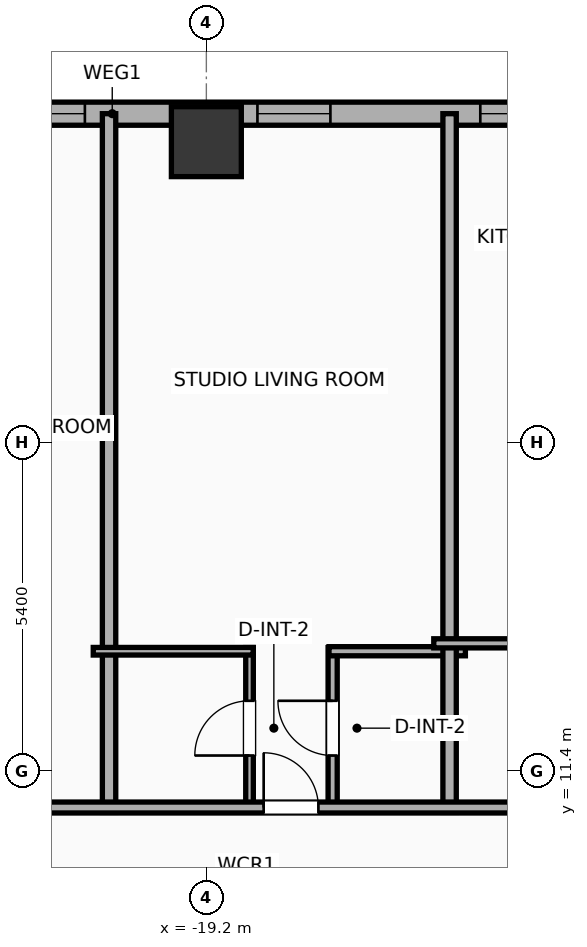
"""IFC4 building model, lengths in metres.
Left out: names, types, materials, properties, quantities, classifications, styles, units other than length and angle.
Written with IfcOpenShell. Run it as: python <this file> out.ifc"""

import sys

from ifc_helpers import new_model, si_unit, direction, frame, frame_2d, origin, origin_2d, place, context, subcontext, project, spatial, rectangle, hollow_rectangle, extrude, element, fill, save


model = new_model("IFC4")
c1 = context("Model", 3, precision=1e-05, world=origin(), true_north=direction((0.0, 1.0)))
c2 = subcontext(c1, "Body", "Model", "MODEL_VIEW")
j1 = project(units=[si_unit("LENGTHUNIT", "METRE"), si_unit("PLANEANGLEUNIT", "RADIAN")], contexts=[c1])
p1 = place(None, origin())
s1 = spatial("IfcSite", under=j1, at=p1, CompositionType="ELEMENT")
p2 = place(p1, origin())
s2 = spatial("IfcBuilding", under=s1, at=p2, CompositionType="ELEMENT")
p3 = place(p2, frame((0.0, 0.0, 61.1)))
s3 = spatial("IfcBuildingStorey", under=s2, at=p3, CompositionType="ELEMENT", Elevation=61.1)
p4 = place(p3, frame((-19.2, 21.75, 0.0), z_axis=(0.0, 0.0, 1.0), x_axis=(1.0, 0.0, 0.0)))
e1 = element("IfcColumn", 1, at=p4, inside=s3, PredefinedType="COLUMN", context=c2, shape_type="SweptSolid", body=[
    extrude(hollow_rectangle(XDim=1.15, YDim=1.15, WallThickness=0.04, at=origin_2d()), origin(), (0.0, 0.0, 1.0), 3.9),
])
p5 = place(p3, frame((-29.581, 22.21, 0.0), z_axis=(0.0, 0.0, 1.0), x_axis=(1.0, 0.0, 0.0)))
e2 = element("IfcWall", 2, at=p5, inside=s3, PredefinedType="ELEMENTEDWALL", context=c2, shape_type="SweptSolid", body=[
    extrude(rectangle(XDim=17.667, YDim=0.38, at=frame_2d((8.833, 0.0))), origin(), (0.0, 0.0, 1.0), 3.65),
])
p6 = place(p5, frame((5.984, 0.0, 0.75)))
e3 = element("IfcOpeningElement", 3, at=p6, cuts=e2, PredefinedType="OPENING", context=c2, shape_type="SweptSolid", body=[
    extrude(rectangle(XDim=2.4, YDim=2.1, at=frame_2d((1.2, 1.05))), frame((0.0, 0.2, 0.0), z_axis=(0.0, -1.0, 0.0), x_axis=(1.0, 0.0, 0.0)), (0.0, 0.0, 1.0), 0.4),
])
p7 = place(p5, frame((1.436, 0.0, 0.75)))
e4 = element("IfcOpeningElement", 4, at=p7, cuts=e2, PredefinedType="OPENING", context=c2, shape_type="SweptSolid", body=[
    extrude(rectangle(XDim=1.2, YDim=2.05, at=frame_2d((0.6, 1.025))), frame((0.0, 0.2, 0.0), z_axis=(0.0, -1.0, 0.0), x_axis=(1.0, 0.0, 0.0)), (0.0, 0.0, 1.0), 0.4),
])
p8 = place(p5, frame((3.686, 0.0, 0.75)))
e5 = element("IfcOpeningElement", 5, at=p8, cuts=e2, PredefinedType="OPENING", context=c2, shape_type="SweptSolid", body=[
    extrude(rectangle(XDim=1.2, YDim=2.05, at=frame_2d((0.6, 1.025))), frame((0.0, 0.2, 0.0), z_axis=(0.0, -1.0, 0.0), x_axis=(1.0, 0.0, 0.0)), (0.0, 0.0, 1.0), 0.4),
])
p9 = place(p5, frame((11.221, 0.0, 0.75)))
e6 = element("IfcOpeningElement", 6, at=p9, cuts=e2, PredefinedType="OPENING", context=c2, shape_type="SweptSolid", body=[
    extrude(rectangle(XDim=1.2, YDim=2.05, at=frame_2d((0.6, 1.025))), frame((0.0, 0.2, 0.0), z_axis=(0.0, -1.0, 0.0), x_axis=(1.0, 0.0, 0.0)), (0.0, 0.0, 1.0), 0.4),
])
p10 = place(p5, frame((14.886, 0.0, 0.75)))
e7 = element("IfcOpeningElement", 7, at=p10, cuts=e2, PredefinedType="OPENING", context=c2, shape_type="SweptSolid", body=[
    extrude(rectangle(XDim=1.2, YDim=2.05, at=frame_2d((0.6, 1.025))), frame((0.0, 0.2, 0.0), z_axis=(0.0, -1.0, 0.0), x_axis=(1.0, 0.0, 0.0)), (0.0, 0.0, 1.0), 0.4),
])
p11 = place(p3, frame((-20.8, 10.72, 0.0), z_axis=(0.0, 0.0, 1.0), x_axis=(0.0, 1.0, 0.0)))
e8 = element("IfcWall", 8, at=p11, inside=s3, PredefinedType="PARTITIONING", context=c2, shape_type="SweptSolid", body=[
    extrude(rectangle(XDim=11.49, YDim=0.22, at=frame_2d((5.745, 0.0))), origin(), (0.0, 0.0, 1.0), 3.65),
])
p12 = place(p3, frame((-18.49, 10.78, 0.0), z_axis=(0.0, 0.0, 1.0), x_axis=(0.0, 1.0, 0.0)))
e9 = element("IfcWall", 9, at=p12, inside=s3, PredefinedType="PARTITIONING", context=c2, shape_type="SweptSolid", body=[
    extrude(rectangle(XDim=2.65, YDim=0.125, at=frame_2d((1.325, 0.0))), origin(), (0.0, 0.0, 1.0), 3.65),
])
p13 = place(p12, frame((0.875, 0.0, 0.0)))
e10 = element("IfcOpeningElement", 10, at=p13, cuts=e9, PredefinedType="OPENING", context=c2, shape_type="SweptSolid", body=[
    extrude(rectangle(XDim=0.9, YDim=2.05, at=frame_2d((0.45, 1.025))), frame((0.0, 0.073, 0.0), z_axis=(0.0, -1.0, 0.0), x_axis=(1.0, 0.0, 0.0)), (0.0, 0.0, 1.0), 0.145),
])
p14 = place(p3, frame((-17.123, 10.78, 0.0), z_axis=(0.0, 0.0, 1.0), x_axis=(0.0, 1.0, 0.0)))
e11 = element("IfcWall", 11, at=p14, inside=s3, PredefinedType="PLUMBINGWALL", context=c2, shape_type="SweptSolid", body=[
    extrude(rectangle(XDim=2.65, YDim=0.15, at=frame_2d((1.325, 0.0))), origin(), (0.0, 0.0, 1.0), 3.65),
])
p15 = place(p14, frame((0.875, 0.0, 0.0)))
e12 = element("IfcOpeningElement", 12, at=p15, cuts=e11, PredefinedType="OPENING", context=c2, shape_type="SweptSolid", body=[
    extrude(rectangle(XDim=0.9, YDim=2.05, at=frame_2d((0.45, 1.025))), frame((0.0, 0.085, 0.0), z_axis=(0.0, -1.0, 0.0), x_axis=(1.0, 0.0, 0.0)), (0.0, 0.0, 1.0), 0.17),
])
p16 = place(p3, frame((-21.06, 13.37, 0.0), z_axis=(0.0, 0.0, 1.0), x_axis=(1.0, 0.0, 0.0)))
e13 = element("IfcWall", 13, at=p16, inside=s3, PredefinedType="PARTITIONING", context=c2, shape_type="SweptSolid", body=[
    extrude(rectangle(XDim=2.63, YDim=0.125, at=frame_2d((1.315, 0.0))), origin(), (0.0, 0.0, 1.0), 3.65),
])
p17 = place(p3, frame((-17.183, 13.37, 0.0), z_axis=(0.0, 0.0, 1.0), x_axis=(1.0, 0.0, 0.0)))
e14 = element("IfcWall", 14, at=p17, inside=s3, PredefinedType="PLUMBINGWALL", context=c2, shape_type="SweptSolid", body=[
    extrude(rectangle(XDim=2.243, YDim=0.15, at=frame_2d((1.122, 0.0))), origin(), (0.0, 0.0, 1.0), 3.65),
])
p18 = place(p3, frame((-15.2, 10.72, 0.0), z_axis=(0.0, 0.0, 1.0), x_axis=(0.0, 1.0, 0.0)))
e15 = element("IfcWall", 15, at=p18, inside=s3, PredefinedType="PARTITIONING", context=c2, shape_type="SweptSolid", body=[
    extrude(rectangle(XDim=11.49, YDim=0.22, at=frame_2d((5.745, 0.0))), origin(), (0.0, 0.0, 1.0), 3.65),
])
p19 = place(p3, frame((-15.46, 13.5, 0.0), z_axis=(0.0, 0.0, 1.0), x_axis=(1.0, 0.0, 0.0)))
e16 = element("IfcWall", 16, at=p19, inside=s3, PredefinedType="PLUMBINGWALL", context=c2, shape_type="SweptSolid", body=[
    extrude(rectangle(XDim=2.55, YDim=0.15, at=frame_2d((1.275, 0.0))), origin(), (0.0, 0.0, 1.0), 3.65),
])
p20 = place(p3, frame((-33.41, 10.8, 0.0), z_axis=(0.0, 0.0, 1.0), x_axis=(1.0, 0.0, 0.0)))
e17 = element("IfcWall", 17, at=p20, inside=s3, PredefinedType="PARTITIONING", context=c2, shape_type="SweptSolid", body=[
    extrude(rectangle(XDim=59.62, YDim=0.18, at=frame_2d((29.81, 0.0))), origin(), (0.0, 0.0, 1.0), 3.65),
])
p21 = place(p20, frame((3.062, 0.0, 0.0)))
e18 = element("IfcOpeningElement", 18, at=p21, cuts=e17, PredefinedType="OPENING", context=c2, shape_type="SweptSolid", body=[
    extrude(rectangle(XDim=1.15, YDim=2.05, at=frame_2d((0.575, 1.025))), frame((0.0, 0.1, 0.0), z_axis=(0.0, -1.0, 0.0), x_axis=(1.0, 0.0, 0.0)), (0.0, 0.0, 1.0), 0.2),
])
p22 = place(p20, frame((10.312, 0.0, 0.0)))
e19 = element("IfcOpeningElement", 19, at=p22, cuts=e17, PredefinedType="OPENING", context=c2, shape_type="SweptSolid", body=[
    extrude(rectangle(XDim=1.15, YDim=2.05, at=frame_2d((0.575, 1.025))), frame((0.0, 0.1, 0.0), z_axis=(0.0, -1.0, 0.0), x_axis=(1.0, 0.0, 0.0)), (0.0, 0.0, 1.0), 0.2),
])
p23 = place(p20, frame((15.153, 0.0, 0.0)))
e20 = element("IfcOpeningElement", 20, at=p23, cuts=e17, PredefinedType="OPENING", context=c2, shape_type="SweptSolid", body=[
    extrude(rectangle(XDim=0.9, YDim=2.05, at=frame_2d((0.45, 1.025))), frame((0.0, 0.1, 0.0), z_axis=(0.0, -1.0, 0.0), x_axis=(1.0, 0.0, 0.0)), (0.0, 0.0, 1.0), 0.2),
])
p24 = place(p20, frame((21.508, 0.0, 0.0)))
e21 = element("IfcOpeningElement", 21, at=p24, cuts=e17, PredefinedType="OPENING", context=c2, shape_type="SweptSolid", body=[
    extrude(rectangle(XDim=1.15, YDim=2.05, at=frame_2d((0.575, 1.025))), frame((0.0, 0.1, 0.0), z_axis=(0.0, -1.0, 0.0), x_axis=(1.0, 0.0, 0.0)), (0.0, 0.0, 1.0), 0.2),
])
p25 = place(p20, frame((26.355, 0.0, 0.0)))
e22 = element("IfcOpeningElement", 22, at=p25, cuts=e17, PredefinedType="OPENING", context=c2, shape_type="SweptSolid", body=[
    extrude(rectangle(XDim=0.9, YDim=2.05, at=frame_2d((0.45, 1.025))), frame((0.0, 0.1, 0.0), z_axis=(0.0, -1.0, 0.0), x_axis=(1.0, 0.0, 0.0)), (0.0, 0.0, 1.0), 0.2),
])
p26 = place(p20, frame((32.753, 0.0, 0.0)))
e23 = element("IfcOpeningElement", 23, at=p26, cuts=e17, PredefinedType="OPENING", context=c2, shape_type="SweptSolid", body=[
    extrude(rectangle(XDim=1.15, YDim=2.05, at=frame_2d((0.575, 1.025))), frame((0.0, 0.1, 0.0), z_axis=(0.0, -1.0, 0.0), x_axis=(1.0, 0.0, 0.0)), (0.0, 0.0, 1.0), 0.2),
])
p27 = place(p20, frame((36.163, 0.0, 0.0)))
e24 = element("IfcOpeningElement", 24, at=p27, cuts=e17, PredefinedType="OPENING", context=c2, shape_type="SweptSolid", body=[
    extrude(rectangle(XDim=1.15, YDim=2.05, at=frame_2d((0.575, 1.025))), frame((0.0, 0.1, 0.0), z_axis=(0.0, -1.0, 0.0), x_axis=(1.0, 0.0, 0.0)), (0.0, 0.0, 1.0), 0.2),
])
p28 = place(p20, frame((43.156, 0.0, 0.0)))
e25 = element("IfcOpeningElement", 25, at=p28, cuts=e17, PredefinedType="OPENING", context=c2, shape_type="SweptSolid", body=[
    extrude(rectangle(XDim=0.9, YDim=2.05, at=frame_2d((0.45, 1.025))), frame((0.0, 0.1, 0.0), z_axis=(0.0, -1.0, 0.0), x_axis=(1.0, 0.0, 0.0)), (0.0, 0.0, 1.0), 0.2),
])
p29 = place(p20, frame((47.36, 0.0, 0.0)))
e26 = element("IfcOpeningElement", 26, at=p29, cuts=e17, PredefinedType="OPENING", context=c2, shape_type="SweptSolid", body=[
    extrude(rectangle(XDim=1.15, YDim=2.05, at=frame_2d((0.575, 1.025))), frame((0.0, 0.1, 0.0), z_axis=(0.0, -1.0, 0.0), x_axis=(1.0, 0.0, 0.0)), (0.0, 0.0, 1.0), 0.2),
])
p30 = place(p20, frame((55.337, 0.0, 0.0)))
e27 = element("IfcOpeningElement", 27, at=p30, cuts=e17, PredefinedType="OPENING", context=c2, shape_type="SweptSolid", body=[
    extrude(rectangle(XDim=1.15, YDim=2.05, at=frame_2d((0.575, 1.025))), frame((0.0, 0.1, 0.0), z_axis=(0.0, -1.0, 0.0), x_axis=(1.0, 0.0, 0.0)), (0.0, 0.0, 1.0), 0.2),
])
p31 = place(p6, origin())
e28 = element("IfcWindow", 28, at=p31, inside=s3, PartitioningType="SINGLE_PANEL", PredefinedType="WINDOW", context=c2, shape_type="SweptSolid", body=[
    extrude(rectangle(XDim=2.4, YDim=2.1, at=frame_2d((1.2, 1.05))), frame((0.0, 0.03, 0.0), z_axis=(0.0, -1.0, 0.0), x_axis=(1.0, 0.0, 0.0)), (0.0, 0.0, 1.0), 0.06),
])
fill(e3, e28)
p32 = place(p9, origin())
e29 = element("IfcWindow", 29, at=p32, inside=s3, PartitioningType="SINGLE_PANEL", PredefinedType="WINDOW", context=c2, shape_type="SweptSolid", body=[
    extrude(rectangle(XDim=1.2, YDim=2.05, at=frame_2d((0.6, 1.025))), frame((0.0, 0.03, 0.0), z_axis=(0.0, -1.0, 0.0), x_axis=(1.0, 0.0, 0.0)), (0.0, 0.0, 1.0), 0.06),
])
fill(e6, e29)
p33 = place(p10, origin())
e30 = element("IfcWindow", 30, at=p33, inside=s3, PartitioningType="SINGLE_PANEL", PredefinedType="WINDOW", context=c2, shape_type="SweptSolid", body=[
    extrude(rectangle(XDim=1.2, YDim=2.05, at=frame_2d((0.6, 1.025))), frame((0.0, 0.03, 0.0), z_axis=(0.0, -1.0, 0.0), x_axis=(1.0, 0.0, 0.0)), (0.0, 0.0, 1.0), 0.06),
])
fill(e7, e30)
p34 = place(p13, origin())
e31 = element("IfcDoor", 31, at=p34, inside=s3, OperationType="SINGLE_SWING_LEFT", PredefinedType="DOOR", context=c2, shape_type="SweptSolid", body=[
    extrude(rectangle(XDim=0.9, YDim=2.05, at=frame_2d((0.45, 1.025))), frame((0.0, 0.025, 0.0), z_axis=(0.0, -1.0, 0.0), x_axis=(1.0, 0.0, 0.0)), (0.0, 0.0, 1.0), 0.05),
])
fill(e10, e31)
p35 = place(p15, origin())
e32 = element("IfcDoor", 32, at=p35, inside=s3, OperationType="SINGLE_SWING_RIGHT", PredefinedType="DOOR", context=c2, shape_type="SweptSolid", body=[
    extrude(rectangle(XDim=0.9, YDim=2.05, at=frame_2d((0.45, 1.025))), frame((0.0, 0.025, 0.0), z_axis=(0.0, -1.0, 0.0), x_axis=(1.0, 0.0, 0.0)), (0.0, 0.0, 1.0), 0.05),
])
fill(e12, e32)
p36 = place(p23, origin())
e33 = element("IfcDoor", 33, at=p36, inside=s3, OperationType="SINGLE_SWING_LEFT", PredefinedType="DOOR", context=c2, shape_type="SweptSolid", body=[
    extrude(rectangle(XDim=0.9, YDim=2.05, at=frame_2d((0.45, 1.025))), frame((0.0, 0.025, 0.0), z_axis=(0.0, -1.0, 0.0), x_axis=(1.0, 0.0, 0.0)), (0.0, 0.0, 1.0), 0.05),
])
fill(e20, e33)
save(model, sys.argv[1])
